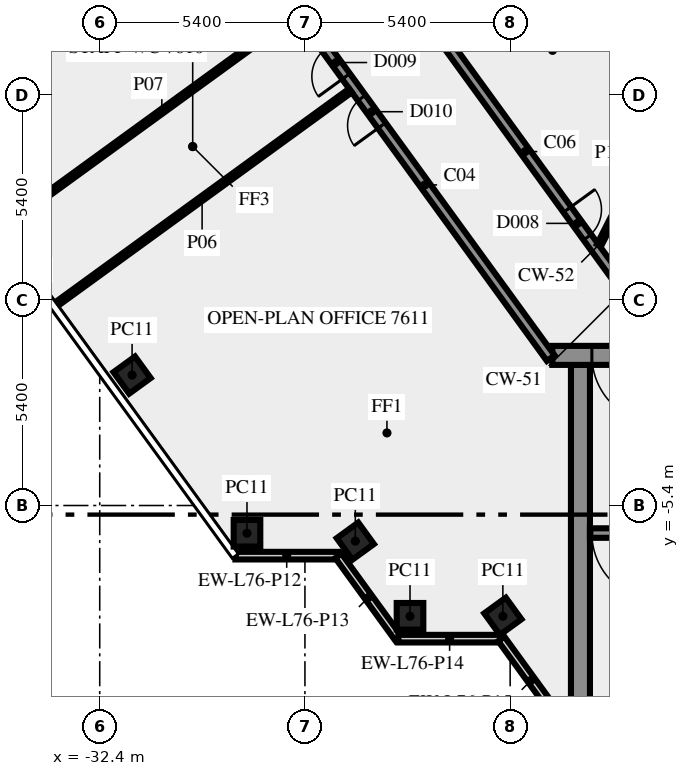
"""IFC4 building model, lengths in metres.
Left out: names, types, materials, properties, quantities, classifications, styles, units other than length and angle.
Written with IfcOpenShell. Run it as: python <this file> out.ifc"""

import sys

from ifc_helpers import new_model, si_unit, direction, frame, frame_2d, origin, origin_2d, place, context, subcontext, project, spatial, rectangle, extrude, element, fill, save


model = new_model("IFC4")
c1 = context("Model", 3, precision=1e-05, world=origin(), true_north=direction((0.0, 1.0)))
c2 = subcontext(c1, "Body", "Model", "MODEL_VIEW")
j1 = project(units=[si_unit("LENGTHUNIT", "METRE"), si_unit("PLANEANGLEUNIT", "RADIAN")], contexts=[c1])
p1 = place(None, origin())
s1 = spatial("IfcSite", under=j1, at=p1, CompositionType="ELEMENT")
p2 = place(p1, origin())
s2 = spatial("IfcBuilding", under=s1, at=p2, CompositionType="ELEMENT")
p3 = place(p2, frame((0.0, 0.0, 327.0)))
s3 = spatial("IfcBuildingStorey", under=s2, at=p3, CompositionType="ELEMENT", Elevation=327.0)
for number, where, z_axis, x_axis in (
    (1, (-31.548, -1.969, 0.0), (0.0, 0.0, 1.0), (0.588, -0.809, 0.0)),
    (2, (-28.525, -6.13, 0.0), (0.0, 0.0, 1.0), (1.0, 0.0, 0.0)),
    (3, (-25.674, -6.337, 0.0), (0.0, 0.0, 1.0), (0.588, -0.809, 0.0)),
    (4, (-24.235, -8.315, 0.0), (0.0, 0.0, 1.0), (1.0, 0.0, 0.0)),
    (5, (-21.792, -8.315, 0.0), (0.0, 0.0, 1.0), (0.588, -0.809, 0.0)),
):
    element("IfcColumn", number, at=place(p3, frame(where, z_axis=z_axis, x_axis=x_axis)), inside=s3, PredefinedType="COLUMN", context=c2, shape_type="SweptSolid", body=[
        extrude(rectangle(XDim=0.7, YDim=0.7, at=origin_2d()), origin(), (0.0, 0.0, 1.0), 3.65),
    ])
p4 = place(p3, frame((-28.83, -6.719, 0.0), z_axis=(0.0, 0.0, 1.0), x_axis=(1.0, 0.0, 0.0)))
e6 = element("IfcWall", 6, at=p4, inside=s3, PredefinedType="SOLIDWALL", context=c2, shape_type="SweptSolid", body=[
    extrude(rectangle(XDim=2.7, YDim=0.2, at=frame_2d((1.35, 0.0))), origin(), (0.0, 0.0, 1.0), 3.65),
])
p5 = place(p3, frame((-26.12, -6.724, 0.0), z_axis=(0.0, 0.0, 1.0), x_axis=(0.587720002413, -0.809064397168, 0.0)))
e7 = element("IfcWall", 7, at=p5, inside=s3, PredefinedType="SOLIDWALL", context=c2, shape_type="SweptSolid", body=[
    extrude(rectangle(XDim=2.7, YDim=0.2, at=frame_2d((1.35, 0.0))), origin(), (0.0, 0.0, 1.0), 3.65),
])
p6 = place(p3, frame((-24.543, -8.904, 0.0), z_axis=(0.0, 0.0, 1.0), x_axis=(1.0, 0.0, 0.0)))
e8 = element("IfcWall", 8, at=p6, inside=s3, PredefinedType="SOLIDWALL", context=c2, shape_type="SweptSolid", body=[
    extrude(rectangle(XDim=2.7, YDim=0.2, at=frame_2d((1.35, 0.0))), origin(), (0.0, 0.0, 1.0), 3.65),
])
p7 = place(p3, frame((-21.833, -8.909, 0.0), z_axis=(0.0, 0.0, 1.0), x_axis=(0.587766567315, -0.809030569476, 0.0)))
e9 = element("IfcWall", 9, at=p7, inside=s3, PredefinedType="SOLIDWALL", context=c2, shape_type="SweptSolid", body=[
    extrude(rectangle(XDim=2.688, YDim=0.2, at=frame_2d((1.344, 0.0))), origin(), (0.0, 0.0, 1.0), 3.65),
])
p8 = place(p3, frame((-19.75, -10.5, 0.0), z_axis=(0.0, 0.0, 1.0), x_axis=(0.0, 1.0, 0.0)))
e10 = element("IfcWall", 10, at=p8, inside=s3, PredefinedType="SHEAR", context=c2, shape_type="SweptSolid", body=[
    extrude(rectangle(XDim=8.8, YDim=0.5, at=frame_2d((4.4, 0.0))), origin(), (0.0, 0.0, 1.0), 3.65),
])
p9 = place(p3, frame((-11.45, -6.125, 0.0), z_axis=(0.0, 0.0, 1.0), x_axis=(-1.0, 0.0, 0.0)))
e11 = element("IfcWall", 11, at=p9, inside=s3, PredefinedType="SHEAR", context=c2, shape_type="SweptSolid", body=[
    extrude(rectangle(XDim=8.05, YDim=0.25, at=frame_2d((4.025, 0.0))), origin(), (0.0, 0.0, 1.0), 3.65),
])
p10 = place(p9, frame((6.2, 0.0, 0.0)))
e12 = element("IfcOpeningElement", 12, at=p10, cuts=e11, PredefinedType="OPENING", context=c2, shape_type="SweptSolid", body=[
    extrude(rectangle(XDim=1.8, YDim=2.1, at=frame_2d((0.9, 1.05))), frame((0.0, 0.135, 0.0), z_axis=(0.0, -1.0, 0.0), x_axis=(1.0, 0.0, 0.0)), (0.0, 0.0, 1.0), 0.27),
])
p11 = place(p3, frame((20.49, -1.45, 0.0), z_axis=(0.0, 0.0, 1.0), x_axis=(-1.0, 0.0, 0.0)))
e13 = element("IfcWall", 13, at=p11, inside=s3, PredefinedType="SHEAR", context=c2, shape_type="SweptSolid", body=[
    extrude(rectangle(XDim=40.98, YDim=0.5, at=frame_2d((20.49, 0.0))), origin(), (0.0, 0.0, 1.0), 3.65),
])
p12 = place(p11, frame((38.14, 0.0, 0.0)))
e14 = element("IfcOpeningElement", 14, at=p12, cuts=e13, PredefinedType="OPENING", context=c2, shape_type="SweptSolid", body=[
    extrude(rectangle(XDim=1.8, YDim=2.1, at=frame_2d((0.9, 1.05))), frame((0.0, 0.26, 0.0), z_axis=(0.0, -1.0, 0.0), x_axis=(1.0, 0.0, 0.0)), (0.0, 0.0, 1.0), 0.52),
])
p13 = place(p11, frame((35.89, 0.0, 0.0)))
e15 = element("IfcOpeningElement", 15, at=p13, cuts=e13, PredefinedType="OPENING", context=c2, shape_type="SweptSolid", body=[
    extrude(rectangle(XDim=0.9, YDim=2.1, at=frame_2d((0.45, 1.05))), frame((0.0, 0.26, 0.0), z_axis=(0.0, -1.0, 0.0), x_axis=(1.0, 0.0, 0.0)), (0.0, 0.0, 1.0), 0.52),
])
p14 = place(p11, frame((32.94, 0.0, 0.0)))
e16 = element("IfcOpeningElement", 16, at=p14, cuts=e13, PredefinedType="OPENING", context=c2, shape_type="SweptSolid", body=[
    extrude(rectangle(XDim=0.9, YDim=2.1, at=frame_2d((0.45, 1.05))), frame((0.0, 0.26, 0.0), z_axis=(0.0, -1.0, 0.0), x_axis=(1.0, 0.0, 0.0)), (0.0, 0.0, 1.0), 0.52),
])
p15 = place(p11, frame((31.015, 0.0, 0.0)))
e17 = element("IfcOpeningElement", 17, at=p15, cuts=e13, PredefinedType="OPENING", context=c2, shape_type="SweptSolid", body=[
    extrude(rectangle(XDim=0.8, YDim=2.1, at=frame_2d((0.4, 1.05))), frame((0.0, 0.26, 0.0), z_axis=(0.0, -1.0, 0.0), x_axis=(1.0, 0.0, 0.0)), (0.0, 0.0, 1.0), 0.52),
])
p16 = place(p11, frame((24.765, 0.0, 0.0)))
e18 = element("IfcOpeningElement", 18, at=p16, cuts=e13, PredefinedType="OPENING", context=c2, shape_type="SweptSolid", body=[
    extrude(rectangle(XDim=0.8, YDim=2.1, at=frame_2d((0.4, 1.05))), frame((0.0, 0.26, 0.0), z_axis=(0.0, -1.0, 0.0), x_axis=(1.0, 0.0, 0.0)), (0.0, 0.0, 1.0), 0.52),
])
p17 = place(p11, frame((21.765, 0.0, 0.0)))
e19 = element("IfcOpeningElement", 19, at=p17, cuts=e13, PredefinedType="OPENING", context=c2, shape_type="SweptSolid", body=[
    extrude(rectangle(XDim=2.0, YDim=2.1, at=frame_2d((1.0, 1.05))), frame((0.0, 0.26, 0.0), z_axis=(0.0, -1.0, 0.0), x_axis=(1.0, 0.0, 0.0)), (0.0, 0.0, 1.0), 0.52),
])
p18 = place(p11, frame((15.103, 0.0, 0.0)))
e20 = element("IfcOpeningElement", 20, at=p18, cuts=e13, PredefinedType="OPENING", context=c2, shape_type="SweptSolid", body=[
    extrude(rectangle(XDim=0.9, YDim=2.1, at=frame_2d((0.45, 1.05))), frame((0.0, 0.26, 0.0), z_axis=(0.0, -1.0, 0.0), x_axis=(1.0, 0.0, 0.0)), (0.0, 0.0, 1.0), 0.52),
])
p19 = place(p11, frame((13.04, 0.0, 0.0)))
e21 = element("IfcOpeningElement", 21, at=p19, cuts=e13, PredefinedType="OPENING", context=c2, shape_type="SweptSolid", body=[
    extrude(rectangle(XDim=0.9, YDim=2.1, at=frame_2d((0.45, 1.05))), frame((0.0, 0.26, 0.0), z_axis=(0.0, -1.0, 0.0), x_axis=(1.0, 0.0, 0.0)), (0.0, 0.0, 1.0), 0.52),
])
p20 = place(p11, frame((10.177, 0.0, 0.0)))
e22 = element("IfcOpeningElement", 22, at=p20, cuts=e13, PredefinedType="OPENING", context=c2, shape_type="SweptSolid", body=[
    extrude(rectangle(XDim=0.9, YDim=2.1, at=frame_2d((0.45, 1.05))), frame((0.0, 0.26, 0.0), z_axis=(0.0, -1.0, 0.0), x_axis=(1.0, 0.0, 0.0)), (0.0, 0.0, 1.0), 0.52),
])
p21 = place(p11, frame((7.14, 0.0, 0.0)))
e23 = element("IfcOpeningElement", 23, at=p21, cuts=e13, PredefinedType="OPENING", context=c2, shape_type="SweptSolid", body=[
    extrude(rectangle(XDim=0.9, YDim=2.1, at=frame_2d((0.45, 1.05))), frame((0.0, 0.26, 0.0), z_axis=(0.0, -1.0, 0.0), x_axis=(1.0, 0.0, 0.0)), (0.0, 0.0, 1.0), 0.52),
])
p22 = place(p11, frame((5.028, 0.0, 0.0)))
e24 = element("IfcOpeningElement", 24, at=p22, cuts=e13, PredefinedType="OPENING", context=c2, shape_type="SweptSolid", body=[
    extrude(rectangle(XDim=0.8, YDim=2.1, at=frame_2d((0.4, 1.05))), frame((0.0, 0.26, 0.0), z_axis=(0.0, -1.0, 0.0), x_axis=(1.0, 0.0, 0.0)), (0.0, 0.0, 1.0), 0.52),
])
p23 = place(p11, frame((3.452, 0.0, 0.0)))
e25 = element("IfcOpeningElement", 25, at=p23, cuts=e13, PredefinedType="OPENING", context=c2, shape_type="SweptSolid", body=[
    extrude(rectangle(XDim=0.8, YDim=2.1, at=frame_2d((0.4, 1.05))), frame((0.0, 0.26, 0.0), z_axis=(0.0, -1.0, 0.0), x_axis=(1.0, 0.0, 0.0)), (0.0, 0.0, 1.0), 0.52),
])
p24 = place(p11, frame((1.04, 0.0, 0.0)))
e26 = element("IfcOpeningElement", 26, at=p24, cuts=e13, PredefinedType="OPENING", context=c2, shape_type="SweptSolid", body=[
    extrude(rectangle(XDim=1.8, YDim=2.1, at=frame_2d((0.9, 1.05))), frame((0.0, 0.26, 0.0), z_axis=(0.0, -1.0, 0.0), x_axis=(1.0, 0.0, 0.0)), (0.0, 0.0, 1.0), 0.52),
])
p25 = place(p3, frame((-20.531, -1.523, 0.0), z_axis=(0.0, 0.0, 1.0), x_axis=(-0.587782646447, 0.809018887626, 0.0)))
e27 = element("IfcWall", 27, at=p25, inside=s3, PredefinedType="SOLIDWALL", context=c2, shape_type="SweptSolid", body=[
    extrude(rectangle(XDim=11.27, YDim=0.25, at=frame_2d((5.635, 0.0))), origin(), (0.0, 0.0, 1.0), 3.65),
])
p26 = place(p25, frame((7.566, 0.0, 0.0)))
e28 = element("IfcOpeningElement", 28, at=p26, cuts=e27, PredefinedType="OPENING", context=c2, shape_type="SweptSolid", body=[
    extrude(rectangle(XDim=0.9, YDim=2.1, at=frame_2d((0.45, 1.05))), frame((0.0, 0.135, 0.0), z_axis=(0.0, -1.0, 0.0), x_axis=(1.0, 0.0, 0.0)), (0.0, 0.0, 1.0), 0.27),
])
p27 = place(p25, frame((9.165, 0.0, 0.0)))
e29 = element("IfcOpeningElement", 29, at=p27, cuts=e27, PredefinedType="OPENING", context=c2, shape_type="SweptSolid", body=[
    extrude(rectangle(XDim=0.9, YDim=2.1, at=frame_2d((0.45, 1.05))), frame((0.0, 0.135, 0.0), z_axis=(0.0, -1.0, 0.0), x_axis=(1.0, 0.0, 0.0)), (0.0, 0.0, 1.0), 0.27),
])
p28 = place(p3, frame((-24.865, 8.95, 0.0), z_axis=(0.0, 0.0, 1.0), x_axis=(0.587791617212, -0.809012369952, 0.0)))
e30 = element("IfcWall", 30, at=p28, inside=s3, PredefinedType="SOLIDWALL", context=c2, shape_type="SweptSolid", body=[
    extrude(rectangle(XDim=12.453, YDim=0.25, at=frame_2d((6.227, 0.0))), origin(), (0.0, 0.0, 1.0), 3.65),
])
p29 = place(p28, frame((8.112, 0.0, 0.0)))
e31 = element("IfcOpeningElement", 31, at=p29, cuts=e30, PredefinedType="OPENING", context=c2, shape_type="SweptSolid", body=[
    extrude(rectangle(XDim=0.9, YDim=2.1, at=frame_2d((0.45, 1.05))), frame((0.0, 0.135, 0.0), z_axis=(0.0, -1.0, 0.0), x_axis=(1.0, 0.0, 0.0)), (0.0, 0.0, 1.0), 0.27),
])
p30 = place(p3, frame((-25.802, 5.519, 0.0), z_axis=(0.0, 0.0, 1.0), x_axis=(-0.808994179369, -0.587816653173, 0.0)))
e32 = element("IfcWall", 32, at=p30, inside=s3, PredefinedType="PARTITIONING", context=c2, shape_type="SweptSolid", body=[
    extrude(rectangle(XDim=9.651, YDim=0.12, at=frame_2d((4.825, 0.0))), origin(), (0.0, 0.0, 1.0), 2.95),
])
p31 = place(p3, frame((-34.291, 2.41, 0.0), z_axis=(0.0, 0.0, 1.0), x_axis=(0.809027940177, 0.587770186393, 0.0)))
e33 = element("IfcWall", 33, at=p31, inside=s3, PredefinedType="PARTITIONING", context=c2, shape_type="SweptSolid", body=[
    extrude(rectangle(XDim=8.715, YDim=0.12, at=frame_2d((4.357, 0.0))), origin(), (0.0, 0.0, 1.0), 3.65),
])
p32 = place(p3, frame((-19.261, 1.45, 0.0), z_axis=(0.0, 0.0, 1.0), x_axis=(0.453950796792, 0.891026752736, 0.0)))
e34 = element("IfcWall", 34, at=p32, inside=s3, PredefinedType="PARTITIONING", context=c2, shape_type="SweptSolid", body=[
    extrude(rectangle(XDim=2.778, YDim=0.12, at=frame_2d((1.389, 0.0))), origin(), (0.0, 0.0, 1.0), 3.65),
])
p33 = place(p10, origin())
e35 = element("IfcDoor", 35, at=p33, inside=s3, OperationType="DOUBLE_DOOR_SINGLE_SWING", PredefinedType="DOOR", context=c2, shape_type="SweptSolid", body=[
    extrude(rectangle(XDim=1.8, YDim=2.1, at=frame_2d((0.9, 1.05))), frame((0.0, 0.025, 0.0), z_axis=(0.0, -1.0, 0.0), x_axis=(1.0, 0.0, 0.0)), (0.0, 0.0, 1.0), 0.05),
])
fill(e12, e35)
p34 = place(p12, origin())
e36 = element("IfcDoor", 36, at=p34, inside=s3, OperationType="DOUBLE_DOOR_SINGLE_SWING", PredefinedType="DOOR", context=c2, shape_type="SweptSolid", body=[
    extrude(rectangle(XDim=1.8, YDim=2.1, at=frame_2d((0.9, 1.05))), frame((0.0, 0.025, 0.0), z_axis=(0.0, -1.0, 0.0), x_axis=(1.0, 0.0, 0.0)), (0.0, 0.0, 1.0), 0.05),
])
fill(e14, e36)
p35 = place(p29, origin())
e37 = element("IfcDoor", 37, at=p35, inside=s3, OperationType="SINGLE_SWING_RIGHT", PredefinedType="DOOR", context=c2, shape_type="SweptSolid", body=[
    extrude(rectangle(XDim=0.9, YDim=2.1, at=frame_2d((0.45, 1.05))), frame((0.0, 0.025, 0.0), z_axis=(0.0, -1.0, 0.0), x_axis=(1.0, 0.0, 0.0)), (0.0, 0.0, 1.0), 0.05),
])
fill(e31, e37)
p36 = place(p26, origin())
e38 = element("IfcDoor", 38, at=p36, inside=s3, OperationType="SINGLE_SWING_RIGHT", PredefinedType="DOOR", context=c2, shape_type="SweptSolid", body=[
    extrude(rectangle(XDim=0.9, YDim=2.1, at=frame_2d((0.45, 1.05))), frame((0.0, 0.025, 0.0), z_axis=(0.0, -1.0, 0.0), x_axis=(1.0, 0.0, 0.0)), (0.0, 0.0, 1.0), 0.05),
])
fill(e28, e38)
p37 = place(p27, origin())
e39 = element("IfcDoor", 39, at=p37, inside=s3, OperationType="SINGLE_SWING_LEFT", PredefinedType="DOOR", context=c2, shape_type="SweptSolid", body=[
    extrude(rectangle(XDim=0.9, YDim=2.1, at=frame_2d((0.45, 1.05))), frame((0.0, 0.025, 0.0), z_axis=(0.0, -1.0, 0.0), x_axis=(1.0, 0.0, 0.0)), (0.0, 0.0, 1.0), 0.05),
])
fill(e29, e39)
save(model, sys.argv[1])
